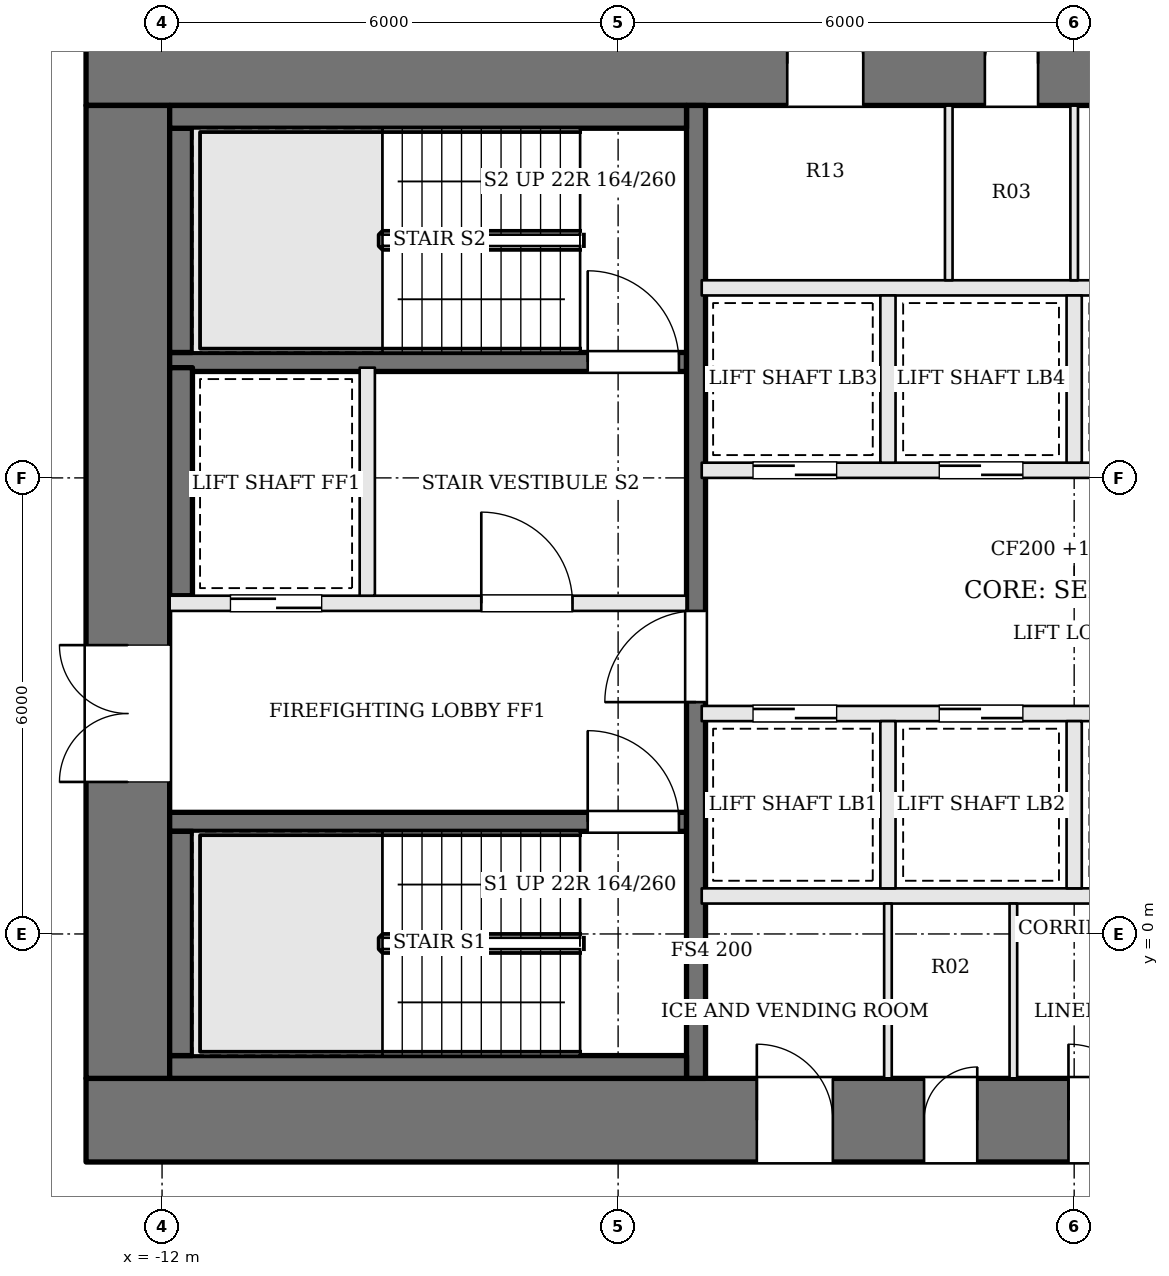
"""IFC4 building model, lengths in metres.
Left out: names, types, materials, properties, quantities, classifications, styles, units other than length and angle.
Written with IfcOpenShell. Run it as: python <this file> out.ifc"""

import sys

from ifc_helpers import new_model, si_unit, direction, frame, frame_2d, origin, place, context, subcontext, project, spatial, rectangle, extrude, element, fill, save


model = new_model("IFC4")
c1 = context("Model", 3, precision=1e-05, world=origin(), true_north=direction((0.0, 1.0)))
c2 = subcontext(c1, "Body", "Model", "MODEL_VIEW")
j1 = project(units=[si_unit("LENGTHUNIT", "METRE"), si_unit("PLANEANGLEUNIT", "RADIAN")], contexts=[c1])
p1 = place(None, origin())
s1 = spatial("IfcSite", under=j1, at=p1, CompositionType="ELEMENT")
p2 = place(p1, origin())
s2 = spatial("IfcBuilding", under=s1, at=p2, CompositionType="ELEMENT")
p3 = place(p2, frame((0.0, 0.0, 110.4)))
s3 = spatial("IfcBuildingStorey", under=s2, at=p3, CompositionType="ELEMENT", Elevation=110.4)
p4 = place(p3, frame((-13.0, 11.45, 0.0), z_axis=(0.0, 0.0, 1.0), x_axis=(1.0, 0.0, 0.0)))
e1 = element("IfcWall", 1, at=p4, inside=s3, PredefinedType="SHEAR", context=c2, shape_type="SweptSolid", body=[
    extrude(rectangle(XDim=26.0, YDim=1.1, at=frame_2d((13.0, 0.0))), origin(), (0.0, 0.0, 1.0), 3.6),
])
p5 = place(p4, frame((9.225, 0.0, 0.0)))
e2 = element("IfcOpeningElement", 2, at=p5, cuts=e1, PredefinedType="OPENING", context=c2, shape_type="SweptSolid", body=[
    extrude(rectangle(XDim=1.0, YDim=2.1, at=frame_2d((0.5, 1.05))), frame((0.0, 0.56, 0.0), z_axis=(0.0, -1.0, 0.0), x_axis=(1.0, 0.0, 0.0)), (0.0, 0.0, 1.0), 1.12),
])
p6 = place(p4, frame((11.825, 0.0, 0.0)))
e3 = element("IfcOpeningElement", 3, at=p6, cuts=e1, PredefinedType="OPENING", context=c2, shape_type="SweptSolid", body=[
    extrude(rectangle(XDim=0.7, YDim=2.1, at=frame_2d((0.35, 1.05))), frame((0.0, 0.56, 0.0), z_axis=(0.0, -1.0, 0.0), x_axis=(1.0, 0.0, 0.0)), (0.0, 0.0, 1.0), 1.12),
])
p7 = place(p4, frame((13.725, 0.0, 0.0)))
e4 = element("IfcOpeningElement", 4, at=p7, cuts=e1, PredefinedType="OPENING", context=c2, shape_type="SweptSolid", body=[
    extrude(rectangle(XDim=1.0, YDim=2.1, at=frame_2d((0.5, 1.05))), frame((0.0, 0.56, 0.0), z_axis=(0.0, -1.0, 0.0), x_axis=(1.0, 0.0, 0.0)), (0.0, 0.0, 1.0), 1.12),
])
p8 = place(p4, frame((16.225, 0.0, 0.0)))
e5 = element("IfcOpeningElement", 5, at=p8, cuts=e1, PredefinedType="OPENING", context=c2, shape_type="SweptSolid", body=[
    extrude(rectangle(XDim=0.9, YDim=2.1, at=frame_2d((0.45, 1.05))), frame((0.0, 0.56, 0.0), z_axis=(0.0, -1.0, 0.0), x_axis=(1.0, 0.0, 0.0)), (0.0, 0.0, 1.0), 1.12),
])
p9 = place(p3, frame((-13.0, -2.45, 0.0), z_axis=(0.0, 0.0, 1.0), x_axis=(1.0, 0.0, 0.0)))
e6 = element("IfcWall", 6, at=p9, inside=s3, PredefinedType="SHEAR", context=c2, shape_type="SweptSolid", body=[
    extrude(rectangle(XDim=26.0, YDim=1.1, at=frame_2d((13.0, 0.0))), origin(), (0.0, 0.0, 1.0), 3.6),
])
p10 = place(p9, frame((8.825, 0.0, 0.0)))
e7 = element("IfcOpeningElement", 7, at=p10, cuts=e6, PredefinedType="OPENING", context=c2, shape_type="SweptSolid", body=[
    extrude(rectangle(XDim=1.0, YDim=2.1, at=frame_2d((0.5, 1.05))), frame((0.0, 0.56, 0.0), z_axis=(0.0, -1.0, 0.0), x_axis=(1.0, 0.0, 0.0)), (0.0, 0.0, 1.0), 1.12),
])
p11 = place(p9, frame((11.025, 0.0, 0.0)))
e8 = element("IfcOpeningElement", 8, at=p11, cuts=e6, PredefinedType="OPENING", context=c2, shape_type="SweptSolid", body=[
    extrude(rectangle(XDim=0.7, YDim=2.1, at=frame_2d((0.35, 1.05))), frame((0.0, 0.56, 0.0), z_axis=(0.0, -1.0, 0.0), x_axis=(1.0, 0.0, 0.0)), (0.0, 0.0, 1.0), 1.12),
])
p12 = place(p9, frame((12.925, 0.0, 0.0)))
e9 = element("IfcOpeningElement", 9, at=p12, cuts=e6, PredefinedType="OPENING", context=c2, shape_type="SweptSolid", body=[
    extrude(rectangle(XDim=1.0, YDim=2.1, at=frame_2d((0.5, 1.05))), frame((0.0, 0.56, 0.0), z_axis=(0.0, -1.0, 0.0), x_axis=(1.0, 0.0, 0.0)), (0.0, 0.0, 1.0), 1.12),
])
p13 = place(p9, frame((15.775, 0.0, 0.0)))
e10 = element("IfcOpeningElement", 10, at=p13, cuts=e6, PredefinedType="OPENING", context=c2, shape_type="SweptSolid", body=[
    extrude(rectangle(XDim=1.0, YDim=2.1, at=frame_2d((0.5, 1.05))), frame((0.0, 0.56, 0.0), z_axis=(0.0, -1.0, 0.0), x_axis=(1.0, 0.0, 0.0)), (0.0, 0.0, 1.0), 1.12),
])
p14 = place(p3, frame((-12.45, -1.9, 0.0), z_axis=(0.0, 0.0, 1.0), x_axis=(0.0, 1.0, 0.0)))
e11 = element("IfcWall", 11, at=p14, inside=s3, PredefinedType="SHEAR", context=c2, shape_type="SweptSolid", body=[
    extrude(rectangle(XDim=12.8, YDim=1.1, at=frame_2d((6.4, 0.0))), origin(), (0.0, 0.0, 1.0), 3.6),
])
p15 = place(p14, frame((3.9, 0.0, 0.0)))
e12 = element("IfcOpeningElement", 12, at=p15, cuts=e11, PredefinedType="OPENING", context=c2, shape_type="SweptSolid", body=[
    extrude(rectangle(XDim=1.8, YDim=2.1, at=frame_2d((0.9, 1.05))), frame((0.0, 0.56, 0.0), z_axis=(0.0, -1.0, 0.0), x_axis=(1.0, 0.0, 0.0)), (0.0, 0.0, 1.0), 1.12),
])
p16 = place(p3, frame((-11.9, 1.475, 0.0), z_axis=(0.0, 0.0, 1.0), x_axis=(1.0, 0.0, 0.0)))
e13 = element("IfcWall", 13, at=p16, inside=s3, PredefinedType="SOLIDWALL", context=c2, shape_type="SweptSolid", body=[
    extrude(rectangle(XDim=6.8, YDim=0.25, at=frame_2d((3.4, 0.0))), origin(), (0.0, 0.0, 1.0), 3.4),
])
p17 = place(p16, frame((5.5, 0.0, 0.0)))
e14 = element("IfcOpeningElement", 14, at=p17, cuts=e13, PredefinedType="OPENING", context=c2, shape_type="SweptSolid", body=[
    extrude(rectangle(XDim=1.2, YDim=2.1, at=frame_2d((0.6, 1.05))), frame((0.0, 0.135, 0.0), z_axis=(0.0, -1.0, 0.0), x_axis=(1.0, 0.0, 0.0)), (0.0, 0.0, 1.0), 0.27),
])
p18 = place(p3, frame((-11.9, 4.35, 0.0), z_axis=(0.0, 0.0, 1.0), x_axis=(1.0, 0.0, 0.0)))
e15 = element("IfcWall", 15, at=p18, inside=s3, PredefinedType="SOLIDWALL", context=c2, shape_type="SweptSolid", body=[
    extrude(rectangle(XDim=6.8, YDim=0.2, at=frame_2d((3.4, 0.0))), origin(), (0.0, 0.0, 1.0), 3.4),
])
p19 = place(p18, frame((4.1, 0.0, 0.0)))
e16 = element("IfcOpeningElement", 16, at=p19, cuts=e15, PredefinedType="OPENING", context=c2, shape_type="SweptSolid", body=[
    extrude(rectangle(XDim=1.2, YDim=2.1, at=frame_2d((0.6, 1.05))), frame((0.0, 0.11, 0.0), z_axis=(0.0, -1.0, 0.0), x_axis=(1.0, 0.0, 0.0)), (0.0, 0.0, 1.0), 0.22),
])
p20 = place(p18, frame((0.8, 0.0, 0.0)))
e17 = element("IfcOpeningElement", 17, at=p20, cuts=e15, PredefinedType="OPENING", context=c2, shape_type="SweptSolid", body=[
    extrude(rectangle(XDim=1.2, YDim=2.1, at=frame_2d((0.6, 1.05))), frame((0.0, 0.11, 0.0), z_axis=(0.0, -1.0, 0.0), x_axis=(1.0, 0.0, 0.0)), (0.0, 0.0, 1.0), 0.22),
])
p21 = place(p3, frame((-11.9, 7.525, 0.0), z_axis=(0.0, 0.0, 1.0), x_axis=(1.0, 0.0, 0.0)))
e18 = element("IfcWall", 18, at=p21, inside=s3, PredefinedType="SOLIDWALL", context=c2, shape_type="SweptSolid", body=[
    extrude(rectangle(XDim=6.8, YDim=0.25, at=frame_2d((3.4, 0.0))), origin(), (0.0, 0.0, 1.0), 3.4),
])
p22 = place(p21, frame((5.5, 0.0, 0.0)))
e19 = element("IfcOpeningElement", 19, at=p22, cuts=e18, PredefinedType="OPENING", context=c2, shape_type="SweptSolid", body=[
    extrude(rectangle(XDim=1.2, YDim=2.1, at=frame_2d((0.6, 1.05))), frame((0.0, 0.135, 0.0), z_axis=(0.0, -1.0, 0.0), x_axis=(1.0, 0.0, 0.0)), (0.0, 0.0, 1.0), 0.27),
])
p23 = place(p3, frame((-9.3, 4.45, 0.0), z_axis=(0.0, 0.0, 1.0), x_axis=(0.0, 1.0, 0.0)))
e20 = element("IfcWall", 20, at=p23, inside=s3, PredefinedType="SOLIDWALL", context=c2, shape_type="SweptSolid", body=[
    extrude(rectangle(XDim=3.0, YDim=0.2, at=frame_2d((1.5, 0.0))), origin(), (0.0, 0.0, 1.0), 3.4),
])
p24 = place(p3, frame((-4.975, -1.9, 0.0), z_axis=(0.0, 0.0, 1.0), x_axis=(0.0, 1.0, 0.0)))
e21 = element("IfcWall", 21, at=p24, inside=s3, PredefinedType="SOLIDWALL", context=c2, shape_type="SweptSolid", body=[
    extrude(rectangle(XDim=12.8, YDim=0.25, at=frame_2d((6.4, 0.0))), origin(), (0.0, 0.0, 1.0), 3.4),
])
p25 = place(p24, frame((4.95, 0.0, 0.0)))
e22 = element("IfcOpeningElement", 22, at=p25, cuts=e21, PredefinedType="OPENING", context=c2, shape_type="SweptSolid", body=[
    extrude(rectangle(XDim=1.2, YDim=2.1, at=frame_2d((0.6, 1.05))), frame((0.0, 0.135, 0.0), z_axis=(0.0, -1.0, 0.0), x_axis=(1.0, 0.0, 0.0)), (0.0, 0.0, 1.0), 0.27),
])
p26 = place(p3, frame((-11.9, -1.75, 0.0), z_axis=(0.0, 0.0, 1.0), x_axis=(1.0, 0.0, 0.0)))
e23 = element("IfcWall", 23, at=p26, inside=s3, PredefinedType="SOLIDWALL", context=c2, shape_type="SweptSolid", body=[
    extrude(rectangle(XDim=6.8, YDim=0.3, at=frame_2d((3.4, 0.0))), origin(), (0.0, 0.0, 1.0), 3.4),
])
p27 = place(p3, frame((-11.75, -1.6, 0.0), z_axis=(0.0, 0.0, 1.0), x_axis=(0.0, 1.0, 0.0)))
e24 = element("IfcWall", 24, at=p27, inside=s3, PredefinedType="SOLIDWALL", context=c2, shape_type="SweptSolid", body=[
    extrude(rectangle(XDim=2.95, YDim=0.3, at=frame_2d((1.475, 0.0))), origin(), (0.0, 0.0, 1.0), 3.4),
])
p28 = place(p3, frame((-11.75, 4.45, 0.0), z_axis=(0.0, 0.0, 1.0), x_axis=(0.0, 1.0, 0.0)))
e25 = element("IfcWall", 25, at=p28, inside=s3, PredefinedType="SOLIDWALL", context=c2, shape_type="SweptSolid", body=[
    extrude(rectangle(XDim=3.0, YDim=0.3, at=frame_2d((1.5, 0.0))), origin(), (0.0, 0.0, 1.0), 3.4),
])
p29 = place(p3, frame((-11.75, 7.65, 0.0), z_axis=(0.0, 0.0, 1.0), x_axis=(0.0, 1.0, 0.0)))
e26 = element("IfcWall", 26, at=p29, inside=s3, PredefinedType="SOLIDWALL", context=c2, shape_type="SweptSolid", body=[
    extrude(rectangle(XDim=2.95, YDim=0.3, at=frame_2d((1.475, 0.0))), origin(), (0.0, 0.0, 1.0), 3.4),
])
p30 = place(p3, frame((-11.9, 10.75, 0.0), z_axis=(0.0, 0.0, 1.0), x_axis=(1.0, 0.0, 0.0)))
e27 = element("IfcWall", 27, at=p30, inside=s3, PredefinedType="SOLIDWALL", context=c2, shape_type="SweptSolid", body=[
    extrude(rectangle(XDim=6.8, YDim=0.3, at=frame_2d((3.4, 0.0))), origin(), (0.0, 0.0, 1.0), 3.4),
])
p31 = place(p3, frame((-4.9, 0.5, 0.0), z_axis=(0.0, 0.0, 1.0), x_axis=(1.0, 0.0, 0.0)))
e28 = element("IfcWall", 28, at=p31, inside=s3, PredefinedType="SOLIDWALL", context=c2, shape_type="SweptSolid", body=[
    extrude(rectangle(XDim=9.8, YDim=0.2, at=frame_2d((4.9, 0.0))), origin(), (0.0, 0.0, 1.0), 3.4),
])
p32 = place(p3, frame((-4.9, 2.9, 0.0), z_axis=(0.0, 0.0, 1.0), x_axis=(1.0, 0.0, 0.0)))
e29 = element("IfcWall", 29, at=p32, inside=s3, PredefinedType="SOLIDWALL", context=c2, shape_type="SweptSolid", body=[
    extrude(rectangle(XDim=9.8, YDim=0.2, at=frame_2d((4.9, 0.0))), origin(), (0.0, 0.0, 1.0), 3.4),
])
p33 = place(p32, frame((0.675, 0.0, 0.0)))
e30 = element("IfcOpeningElement", 30, at=p33, cuts=e29, PredefinedType="OPENING", context=c2, shape_type="SweptSolid", body=[
    extrude(rectangle(XDim=1.1, YDim=2.1, at=frame_2d((0.55, 1.05))), frame((0.0, 0.11, 0.0), z_axis=(0.0, -1.0, 0.0), x_axis=(1.0, 0.0, 0.0)), (0.0, 0.0, 1.0), 0.22),
])
p34 = place(p32, frame((3.125, 0.0, 0.0)))
e31 = element("IfcOpeningElement", 31, at=p34, cuts=e29, PredefinedType="OPENING", context=c2, shape_type="SweptSolid", body=[
    extrude(rectangle(XDim=1.1, YDim=2.1, at=frame_2d((0.55, 1.05))), frame((0.0, 0.11, 0.0), z_axis=(0.0, -1.0, 0.0), x_axis=(1.0, 0.0, 0.0)), (0.0, 0.0, 1.0), 0.22),
])
p35 = place(p3, frame((-4.9, 6.1, 0.0), z_axis=(0.0, 0.0, 1.0), x_axis=(1.0, 0.0, 0.0)))
e32 = element("IfcWall", 32, at=p35, inside=s3, PredefinedType="SOLIDWALL", context=c2, shape_type="SweptSolid", body=[
    extrude(rectangle(XDim=9.8, YDim=0.2, at=frame_2d((4.9, 0.0))), origin(), (0.0, 0.0, 1.0), 3.4),
])
p36 = place(p35, frame((0.675, 0.0, 0.0)))
e33 = element("IfcOpeningElement", 33, at=p36, cuts=e32, PredefinedType="OPENING", context=c2, shape_type="SweptSolid", body=[
    extrude(rectangle(XDim=1.1, YDim=2.1, at=frame_2d((0.55, 1.05))), frame((0.0, 0.11, 0.0), z_axis=(0.0, -1.0, 0.0), x_axis=(1.0, 0.0, 0.0)), (0.0, 0.0, 1.0), 0.22),
])
p37 = place(p35, frame((3.125, 0.0, 0.0)))
e34 = element("IfcOpeningElement", 34, at=p37, cuts=e32, PredefinedType="OPENING", context=c2, shape_type="SweptSolid", body=[
    extrude(rectangle(XDim=1.1, YDim=2.1, at=frame_2d((0.55, 1.05))), frame((0.0, 0.11, 0.0), z_axis=(0.0, -1.0, 0.0), x_axis=(1.0, 0.0, 0.0)), (0.0, 0.0, 1.0), 0.22),
])
p38 = place(p35, frame((5.575, 0.0, 0.0)))
e35 = element("IfcOpeningElement", 35, at=p38, cuts=e32, PredefinedType="OPENING", context=c2, shape_type="SweptSolid", body=[
    extrude(rectangle(XDim=1.1, YDim=2.1, at=frame_2d((0.55, 1.05))), frame((0.0, 0.11, 0.0), z_axis=(0.0, -1.0, 0.0), x_axis=(1.0, 0.0, 0.0)), (0.0, 0.0, 1.0), 0.22),
])
p39 = place(p35, frame((8.025, 0.0, 0.0)))
e36 = element("IfcOpeningElement", 36, at=p39, cuts=e32, PredefinedType="OPENING", context=c2, shape_type="SweptSolid", body=[
    extrude(rectangle(XDim=1.1, YDim=2.1, at=frame_2d((0.55, 1.05))), frame((0.0, 0.11, 0.0), z_axis=(0.0, -1.0, 0.0), x_axis=(1.0, 0.0, 0.0)), (0.0, 0.0, 1.0), 0.22),
])
p40 = place(p3, frame((-4.9, 8.5, 0.0), z_axis=(0.0, 0.0, 1.0), x_axis=(1.0, 0.0, 0.0)))
e37 = element("IfcWall", 37, at=p40, inside=s3, PredefinedType="SOLIDWALL", context=c2, shape_type="SweptSolid", body=[
    extrude(rectangle(XDim=9.8, YDim=0.2, at=frame_2d((4.9, 0.0))), origin(), (0.0, 0.0, 1.0), 3.4),
])
for number, where, z_axis, x_axis in (
    (38, (-2.45, 0.6, 0.0), (0.0, 0.0, 1.0), (0.0, 1.0, 0.0)),
    (39, (0.0, 0.6, 0.0), (0.0, 0.0, 1.0), (0.0, 1.0, 0.0)),
    (40, (-2.45, 6.2, 0.0), (0.0, 0.0, 1.0), (0.0, 1.0, 0.0)),
    (41, (0.0, 6.2, 0.0), (0.0, 0.0, 1.0), (0.0, 1.0, 0.0)),
):
    element("IfcWall", number, at=place(p3, frame(where, z_axis=z_axis, x_axis=x_axis)), inside=s3, PredefinedType="SOLIDWALL", context=c2, shape_type="SweptSolid", body=[
        extrude(rectangle(XDim=2.2, YDim=0.2, at=frame_2d((1.1, 0.0))), origin(), (0.0, 0.0, 1.0), 3.4),
    ])
for number, where, z_axis, x_axis in (
    (42, (-2.45, -1.9, 0.0), (0.0, 0.0, 1.0), (0.0, 1.0, 0.0)),
    (43, (-0.8, -1.9, 0.0), (0.0, 0.0, 1.0), (0.0, 1.0, 0.0)),
    (44, (-1.65, 8.6, 0.0), (0.0, 0.0, 1.0), (0.0, 1.0, 0.0)),
    (45, (0.0, 8.6, 0.0), (0.0, 0.0, 1.0), (0.0, 1.0, 0.0)),
):
    element("IfcWall", number, at=place(p3, frame(where, z_axis=z_axis, x_axis=x_axis)), inside=s3, PredefinedType="PARTITIONING", context=c2, shape_type="SweptSolid", body=[
        extrude(rectangle(XDim=2.3, YDim=0.1, at=frame_2d((1.15, 0.0))), origin(), (0.0, 0.0, 1.0), 3.4),
    ])
p41 = place(p15, origin())
e46 = element("IfcDoor", 46, at=p41, inside=s3, OperationType="DOUBLE_DOOR_SINGLE_SWING", PredefinedType="DOOR", context=c2, shape_type="SweptSolid", body=[
    extrude(rectangle(XDim=1.8, YDim=2.1, at=frame_2d((0.9, 1.05))), frame((0.0, 0.025, 0.0), z_axis=(0.0, -1.0, 0.0), x_axis=(1.0, 0.0, 0.0)), (0.0, 0.0, 1.0), 0.05),
])
fill(e12, e46)
p42 = place(p25, origin())
e47 = element("IfcDoor", 47, at=p42, inside=s3, OperationType="SINGLE_SWING_LEFT", PredefinedType="DOOR", context=c2, shape_type="SweptSolid", body=[
    extrude(rectangle(XDim=1.2, YDim=2.1, at=frame_2d((0.6, 1.05))), frame((0.0, 0.025, 0.0), z_axis=(0.0, -1.0, 0.0), x_axis=(1.0, 0.0, 0.0)), (0.0, 0.0, 1.0), 0.05),
])
fill(e22, e47)
p43 = place(p19, origin())
e48 = element("IfcDoor", 48, at=p43, inside=s3, OperationType="SINGLE_SWING_LEFT", PredefinedType="DOOR", context=c2, shape_type="SweptSolid", body=[
    extrude(rectangle(XDim=1.2, YDim=2.1, at=frame_2d((0.6, 1.05))), frame((0.0, 0.025, 0.0), z_axis=(0.0, -1.0, 0.0), x_axis=(1.0, 0.0, 0.0)), (0.0, 0.0, 1.0), 0.05),
])
fill(e16, e48)
p44 = place(p17, origin())
e49 = element("IfcDoor", 49, at=p44, inside=s3, OperationType="SINGLE_SWING_LEFT", PredefinedType="DOOR", context=c2, shape_type="SweptSolid", body=[
    extrude(rectangle(XDim=1.2, YDim=2.1, at=frame_2d((0.6, 1.05))), frame((0.0, 0.025, 0.0), z_axis=(0.0, -1.0, 0.0), x_axis=(1.0, 0.0, 0.0)), (0.0, 0.0, 1.0), 0.05),
])
fill(e14, e49)
p45 = place(p22, origin())
e50 = element("IfcDoor", 50, at=p45, inside=s3, OperationType="SINGLE_SWING_LEFT", PredefinedType="DOOR", context=c2, shape_type="SweptSolid", body=[
    extrude(rectangle(XDim=1.2, YDim=2.1, at=frame_2d((0.6, 1.05))), frame((0.0, 0.025, 0.0), z_axis=(0.0, -1.0, 0.0), x_axis=(1.0, 0.0, 0.0)), (0.0, 0.0, 1.0), 0.05),
])
fill(e19, e50)
p46 = place(p20, origin())
e51 = element("IfcDoor", 51, at=p46, inside=s3, OperationType="SLIDING_TO_RIGHT", PredefinedType="DOOR", context=c2, shape_type="SweptSolid", body=[
    extrude(rectangle(XDim=1.2, YDim=2.1, at=frame_2d((0.6, 1.05))), frame((0.0, 0.025, 0.0), z_axis=(0.0, -1.0, 0.0), x_axis=(1.0, 0.0, 0.0)), (0.0, 0.0, 1.0), 0.05),
])
fill(e17, e51)
p47 = place(p33, origin())
e52 = element("IfcDoor", 52, at=p47, inside=s3, OperationType="SLIDING_TO_RIGHT", PredefinedType="DOOR", context=c2, shape_type="SweptSolid", body=[
    extrude(rectangle(XDim=1.1, YDim=2.1, at=frame_2d((0.55, 1.05))), frame((0.0, 0.025, 0.0), z_axis=(0.0, -1.0, 0.0), x_axis=(1.0, 0.0, 0.0)), (0.0, 0.0, 1.0), 0.05),
])
fill(e30, e52)
p48 = place(p34, origin())
e53 = element("IfcDoor", 53, at=p48, inside=s3, OperationType="SLIDING_TO_LEFT", PredefinedType="DOOR", context=c2, shape_type="SweptSolid", body=[
    extrude(rectangle(XDim=1.1, YDim=2.1, at=frame_2d((0.55, 1.05))), frame((0.0, 0.025, 0.0), z_axis=(0.0, -1.0, 0.0), x_axis=(1.0, 0.0, 0.0)), (0.0, 0.0, 1.0), 0.05),
])
fill(e31, e53)
p49 = place(p36, origin())
e54 = element("IfcDoor", 54, at=p49, inside=s3, OperationType="SLIDING_TO_RIGHT", PredefinedType="DOOR", context=c2, shape_type="SweptSolid", body=[
    extrude(rectangle(XDim=1.1, YDim=2.1, at=frame_2d((0.55, 1.05))), frame((0.0, 0.025, 0.0), z_axis=(0.0, -1.0, 0.0), x_axis=(1.0, 0.0, 0.0)), (0.0, 0.0, 1.0), 0.05),
])
fill(e33, e54)
p50 = place(p37, origin())
e55 = element("IfcDoor", 55, at=p50, inside=s3, OperationType="SLIDING_TO_LEFT", PredefinedType="DOOR", context=c2, shape_type="SweptSolid", body=[
    extrude(rectangle(XDim=1.1, YDim=2.1, at=frame_2d((0.55, 1.05))), frame((0.0, 0.025, 0.0), z_axis=(0.0, -1.0, 0.0), x_axis=(1.0, 0.0, 0.0)), (0.0, 0.0, 1.0), 0.05),
])
fill(e34, e55)
p51 = place(p10, origin())
e56 = element("IfcDoor", 56, at=p51, inside=s3, OperationType="SINGLE_SWING_LEFT", PredefinedType="DOOR", context=c2, shape_type="SweptSolid", body=[
    extrude(rectangle(XDim=1.0, YDim=2.1, at=frame_2d((0.5, 1.05))), frame((0.0, 0.025, 0.0), z_axis=(0.0, -1.0, 0.0), x_axis=(1.0, 0.0, 0.0)), (0.0, 0.0, 1.0), 0.05),
])
fill(e7, e56)
p52 = place(p11, origin())
e57 = element("IfcDoor", 57, at=p52, inside=s3, OperationType="SINGLE_SWING_RIGHT", PredefinedType="DOOR", context=c2, shape_type="SweptSolid", body=[
    extrude(rectangle(XDim=0.7, YDim=2.1, at=frame_2d((0.35, 1.05))), frame((0.0, 0.025, 0.0), z_axis=(0.0, -1.0, 0.0), x_axis=(1.0, 0.0, 0.0)), (0.0, 0.0, 1.0), 0.05),
])
fill(e8, e57)
p53 = place(p12, origin())
e58 = element("IfcDoor", 58, at=p53, inside=s3, OperationType="SINGLE_SWING_LEFT", PredefinedType="DOOR", context=c2, shape_type="SweptSolid", body=[
    extrude(rectangle(XDim=1.0, YDim=2.1, at=frame_2d((0.5, 1.05))), frame((0.0, 0.025, 0.0), z_axis=(0.0, -1.0, 0.0), x_axis=(1.0, 0.0, 0.0)), (0.0, 0.0, 1.0), 0.05),
])
fill(e9, e58)
p54 = place(p5, origin())
e59 = element("IfcDoor", 59, at=p54, inside=s3, OperationType="SINGLE_SWING_LEFT", PredefinedType="DOOR", context=c2, shape_type="SweptSolid", body=[
    extrude(rectangle(XDim=1.0, YDim=2.1, at=frame_2d((0.5, 1.05))), frame((0.0, 0.025, 0.0), z_axis=(0.0, -1.0, 0.0), x_axis=(1.0, 0.0, 0.0)), (0.0, 0.0, 1.0), 0.05),
])
fill(e2, e59)
p55 = place(p6, origin())
e60 = element("IfcDoor", 60, at=p55, inside=s3, OperationType="SINGLE_SWING_RIGHT", PredefinedType="DOOR", context=c2, shape_type="SweptSolid", body=[
    extrude(rectangle(XDim=0.7, YDim=2.1, at=frame_2d((0.35, 1.05))), frame((0.0, 0.025, 0.0), z_axis=(0.0, -1.0, 0.0), x_axis=(1.0, 0.0, 0.0)), (0.0, 0.0, 1.0), 0.05),
])
fill(e3, e60)
save(model, sys.argv[1])
